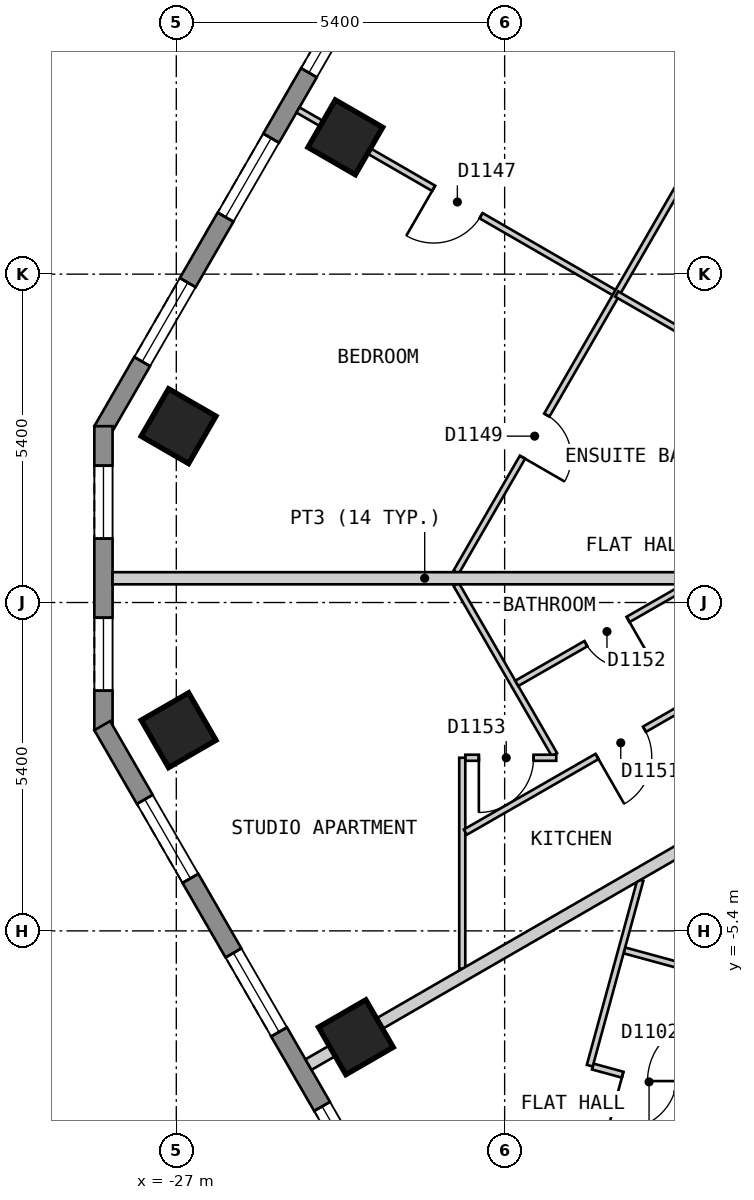
"""IFC4 building model, lengths in metres.
Left out: names, types, materials, properties, quantities, classifications, styles, units other than length and angle.
Written with IfcOpenShell. Run it as: python <this file> out.ifc"""

import sys

from ifc_helpers import new_model, si_unit, direction, frame, frame_2d, origin, origin_2d, place, context, subcontext, project, spatial, polyline, rectangle, outline, extrude, element, fill, save


model = new_model("IFC4")
c1 = context("Model", 3, precision=1e-05, world=origin(), true_north=direction((0.0, 1.0)))
c2 = subcontext(c1, "Body", "Model", "MODEL_VIEW")
j1 = project(units=[si_unit("LENGTHUNIT", "METRE"), si_unit("PLANEANGLEUNIT", "RADIAN")], contexts=[c1])
p1 = place(None, origin())
s1 = spatial("IfcSite", under=j1, at=p1, CompositionType="ELEMENT")
p2 = place(p1, origin())
s2 = spatial("IfcBuilding", under=s1, at=p2, CompositionType="ELEMENT")
p3 = place(p2, frame((0.0, 0.0, 144.6)))
s3 = spatial("IfcBuildingStorey", under=s2, at=p3, CompositionType="ELEMENT", Elevation=144.6)
for number, where, z_axis, x_axis in (
    (1, (-24.22, 7.65, 0.0), (0.0, 0.0, 1.0), (-0.5, -0.866, 0.0)),
    (2, (-26.963, 2.9, 0.0), (0.0, 0.0, 1.0), (-0.5, -0.866, 0.0)),
    (3, (-26.962, -2.1, 0.0), (0.0, 0.0, 1.0), (0.5, -0.866, 0.0)),
    (4, (-24.047, -7.149, 0.0), (0.0, 0.0, 1.0), (0.5, -0.866, 0.0)),
):
    element("IfcColumn", number, at=place(p3, frame(where, z_axis=z_axis, x_axis=x_axis)), inside=s3, PredefinedType="COLUMN", context=c2, shape_type="SweptSolid", body=[
        extrude(rectangle(XDim=0.9, YDim=0.9, at=origin_2d()), origin(), (0.0, 0.0, 1.0), 3.0),
    ])
p4 = place(p3, frame((-16.555, 23.025, 0.0), z_axis=(0.0, 0.0, 1.0), x_axis=(-0.500020536353, -0.866013546791, 0.0)))
e5 = element("IfcWall", 5, at=p4, inside=s3, PredefinedType="SOLIDWALL", context=c2, shape_type="SweptSolid", body=[
    extrude(outline(polyline([(0.0, -0.15), (23.325, -0.15), (23.245, 0.15), (0.08, 0.15), (0.0, -0.15)])), origin(), (0.0, 0.0, 1.0), 2.7),
])
p5 = place(p4, frame((1.314, 0.0, 0.15)))
e6 = element("IfcOpeningElement", 6, at=p5, cuts=e5, PredefinedType="OPENING", context=c2, shape_type="SweptSolid", body=[
    extrude(rectangle(XDim=1.5, YDim=2.1, at=frame_2d((0.75, 1.05))), frame((0.0, 0.16, 0.0), z_axis=(0.0, -1.0, 0.0), x_axis=(1.0, 0.0, 0.0)), (0.0, 0.0, 1.0), 0.32),
])
p6 = place(p4, frame((4.056, 0.0, 0.15)))
e7 = element("IfcOpeningElement", 7, at=p6, cuts=e5, PredefinedType="OPENING", context=c2, shape_type="SweptSolid", body=[
    extrude(rectangle(XDim=1.5, YDim=2.1, at=frame_2d((0.75, 1.05))), frame((0.0, 0.16, 0.0), z_axis=(0.0, -1.0, 0.0), x_axis=(1.0, 0.0, 0.0)), (0.0, 0.0, 1.0), 0.32),
])
p7 = place(p4, frame((6.799, 0.0, 0.15)))
e8 = element("IfcOpeningElement", 8, at=p7, cuts=e5, PredefinedType="OPENING", context=c2, shape_type="SweptSolid", body=[
    extrude(rectangle(XDim=1.5, YDim=2.1, at=frame_2d((0.75, 1.05))), frame((0.0, 0.16, 0.0), z_axis=(0.0, -1.0, 0.0), x_axis=(1.0, 0.0, 0.0)), (0.0, 0.0, 1.0), 0.32),
])
p8 = place(p4, frame((9.541, 0.0, 0.15)))
e9 = element("IfcOpeningElement", 9, at=p8, cuts=e5, PredefinedType="OPENING", context=c2, shape_type="SweptSolid", body=[
    extrude(rectangle(XDim=1.5, YDim=2.1, at=frame_2d((0.75, 1.05))), frame((0.0, 0.16, 0.0), z_axis=(0.0, -1.0, 0.0), x_axis=(1.0, 0.0, 0.0)), (0.0, 0.0, 1.0), 0.32),
])
p9 = place(p4, frame((12.285, 0.0, 0.15)))
e10 = element("IfcOpeningElement", 10, at=p9, cuts=e5, PredefinedType="OPENING", context=c2, shape_type="SweptSolid", body=[
    extrude(rectangle(XDim=1.5, YDim=2.1, at=frame_2d((0.75, 1.05))), frame((0.0, 0.16, 0.0), z_axis=(0.0, -1.0, 0.0), x_axis=(1.0, 0.0, 0.0)), (0.0, 0.0, 1.0), 0.32),
])
p10 = place(p4, frame((15.027, 0.0, 0.15)))
e11 = element("IfcOpeningElement", 11, at=p10, cuts=e5, PredefinedType="OPENING", context=c2, shape_type="SweptSolid", body=[
    extrude(rectangle(XDim=1.5, YDim=2.1, at=frame_2d((0.75, 1.05))), frame((0.0, 0.16, 0.0), z_axis=(0.0, -1.0, 0.0), x_axis=(1.0, 0.0, 0.0)), (0.0, 0.0, 1.0), 0.32),
])
p11 = place(p4, frame((17.769, 0.0, 0.15)))
e12 = element("IfcOpeningElement", 12, at=p11, cuts=e5, PredefinedType="OPENING", context=c2, shape_type="SweptSolid", body=[
    extrude(rectangle(XDim=1.5, YDim=2.1, at=frame_2d((0.75, 1.05))), frame((0.0, 0.16, 0.0), z_axis=(0.0, -1.0, 0.0), x_axis=(1.0, 0.0, 0.0)), (0.0, 0.0, 1.0), 0.32),
])
p12 = place(p4, frame((20.512, 0.0, 0.15)))
e13 = element("IfcOpeningElement", 13, at=p12, cuts=e5, PredefinedType="OPENING", context=c2, shape_type="SweptSolid", body=[
    extrude(rectangle(XDim=1.5, YDim=2.1, at=frame_2d((0.75, 1.05))), frame((0.0, 0.16, 0.0), z_axis=(0.0, -1.0, 0.0), x_axis=(1.0, 0.0, 0.0)), (0.0, 0.0, 1.0), 0.32),
])
p13 = place(p3, frame((-28.198, 2.9, 0.0), z_axis=(0.0, 0.0, 1.0), x_axis=(0.0, -1.0, 0.0)))
e14 = element("IfcWall", 14, at=p13, inside=s3, PredefinedType="SOLIDWALL", context=c2, shape_type="SweptSolid", body=[
    extrude(outline(polyline([(0.0, -0.15), (5.0, -0.15), (4.92, 0.15), (0.08, 0.15), (0.0, -0.15)])), origin(), (0.0, 0.0, 1.0), 2.7),
])
p14 = place(p13, frame((0.65, 0.0, 0.15)))
e15 = element("IfcOpeningElement", 15, at=p14, cuts=e14, PredefinedType="OPENING", context=c2, shape_type="SweptSolid", body=[
    extrude(rectangle(XDim=1.2, YDim=2.1, at=frame_2d((0.6, 1.05))), frame((0.0, 0.16, 0.0), z_axis=(0.0, -1.0, 0.0), x_axis=(1.0, 0.0, 0.0)), (0.0, 0.0, 1.0), 0.32),
])
p15 = place(p13, frame((3.15, 0.0, 0.15)))
e16 = element("IfcOpeningElement", 16, at=p15, cuts=e14, PredefinedType="OPENING", context=c2, shape_type="SweptSolid", body=[
    extrude(rectangle(XDim=1.2, YDim=2.1, at=frame_2d((0.6, 1.05))), frame((0.0, 0.16, 0.0), z_axis=(0.0, -1.0, 0.0), x_axis=(1.0, 0.0, 0.0)), (0.0, 0.0, 1.0), 0.32),
])
p16 = place(p3, frame((-28.218, -2.025, 0.0), z_axis=(0.0, 0.0, 1.0), x_axis=(0.500017503135, -0.866015298109, 0.0)))
e17 = element("IfcWall", 17, at=p16, inside=s3, PredefinedType="SOLIDWALL", context=c2, shape_type="SweptSolid", body=[
    extrude(outline(polyline([(0.0, -0.15), (24.711, -0.15), (24.631, 0.15), (0.08, 0.15), (0.0, -0.15)])), origin(), (0.0, 0.0, 1.0), 2.7),
])
p17 = place(p16, frame((1.4, 0.0, 0.15)))
e18 = element("IfcOpeningElement", 18, at=p17, cuts=e17, PredefinedType="OPENING", context=c2, shape_type="SweptSolid", body=[
    extrude(rectangle(XDim=1.5, YDim=2.1, at=frame_2d((0.75, 1.05))), frame((0.0, 0.16, 0.0), z_axis=(0.0, -1.0, 0.0), x_axis=(1.0, 0.0, 0.0)), (0.0, 0.0, 1.0), 0.32),
])
p18 = place(p16, frame((4.316, 0.0, 0.15)))
e19 = element("IfcOpeningElement", 19, at=p18, cuts=e17, PredefinedType="OPENING", context=c2, shape_type="SweptSolid", body=[
    extrude(rectangle(XDim=1.5, YDim=2.1, at=frame_2d((0.75, 1.05))), frame((0.0, 0.16, 0.0), z_axis=(0.0, -1.0, 0.0), x_axis=(1.0, 0.0, 0.0)), (0.0, 0.0, 1.0), 0.32),
])
p19 = place(p16, frame((7.231, 0.0, 0.15)))
e20 = element("IfcOpeningElement", 20, at=p19, cuts=e17, PredefinedType="OPENING", context=c2, shape_type="SweptSolid", body=[
    extrude(rectangle(XDim=1.5, YDim=2.1, at=frame_2d((0.75, 1.05))), frame((0.0, 0.16, 0.0), z_axis=(0.0, -1.0, 0.0), x_axis=(1.0, 0.0, 0.0)), (0.0, 0.0, 1.0), 0.32),
])
p20 = place(p16, frame((10.147, 0.0, 0.15)))
e21 = element("IfcOpeningElement", 21, at=p20, cuts=e17, PredefinedType="OPENING", context=c2, shape_type="SweptSolid", body=[
    extrude(rectangle(XDim=1.5, YDim=2.1, at=frame_2d((0.75, 1.05))), frame((0.0, 0.16, 0.0), z_axis=(0.0, -1.0, 0.0), x_axis=(1.0, 0.0, 0.0)), (0.0, 0.0, 1.0), 0.32),
])
p21 = place(p16, frame((13.062, 0.0, 0.15)))
e22 = element("IfcOpeningElement", 22, at=p21, cuts=e17, PredefinedType="OPENING", context=c2, shape_type="SweptSolid", body=[
    extrude(rectangle(XDim=1.5, YDim=2.1, at=frame_2d((0.75, 1.05))), frame((0.0, 0.16, 0.0), z_axis=(0.0, -1.0, 0.0), x_axis=(1.0, 0.0, 0.0)), (0.0, 0.0, 1.0), 0.32),
])
p22 = place(p16, frame((15.977, 0.0, 0.15)))
e23 = element("IfcOpeningElement", 23, at=p22, cuts=e17, PredefinedType="OPENING", context=c2, shape_type="SweptSolid", body=[
    extrude(rectangle(XDim=1.5, YDim=2.1, at=frame_2d((0.75, 1.05))), frame((0.0, 0.16, 0.0), z_axis=(0.0, -1.0, 0.0), x_axis=(1.0, 0.0, 0.0)), (0.0, 0.0, 1.0), 0.32),
])
p23 = place(p16, frame((18.893, 0.0, 0.15)))
e24 = element("IfcOpeningElement", 24, at=p23, cuts=e17, PredefinedType="OPENING", context=c2, shape_type="SweptSolid", body=[
    extrude(rectangle(XDim=1.5, YDim=2.1, at=frame_2d((0.75, 1.05))), frame((0.0, 0.16, 0.0), z_axis=(0.0, -1.0, 0.0), x_axis=(1.0, 0.0, 0.0)), (0.0, 0.0, 1.0), 0.32),
])
p24 = place(p16, frame((21.809, 0.0, 0.15)))
e25 = element("IfcOpeningElement", 25, at=p24, cuts=e17, PredefinedType="OPENING", context=c2, shape_type="SweptSolid", body=[
    extrude(rectangle(XDim=1.5, YDim=2.1, at=frame_2d((0.75, 1.05))), frame((0.0, 0.16, 0.0), z_axis=(0.0, -1.0, 0.0), x_axis=(1.0, 0.0, 0.0)), (0.0, 0.0, 1.0), 0.32),
])
p25 = place(p3, frame((-22.398, 0.299, 0.0), z_axis=(0.0, 0.0, 1.0), x_axis=(0.50004249738, -0.86600086652, 0.0)))
e26 = element("IfcWall", 26, at=p25, inside=s3, PredefinedType="PARTITIONING", context=c2, shape_type="SweptSolid", body=[
    extrude(rectangle(XDim=3.236, YDim=0.1, at=frame_2d((1.618, 0.0))), origin(), (0.0, 0.0, 1.0), 2.7),
])
p26 = place(p3, frame((-19.631, -5.721, 0.0), z_axis=(0.0, 0.0, 1.0), x_axis=(0.964816035809, -0.262925877475, 0.0)))
e27 = element("IfcWall", 27, at=p26, inside=s3, PredefinedType="PARTITIONING", context=c2, shape_type="SweptSolid", body=[
    extrude(rectangle(XDim=3.344, YDim=0.1, at=frame_2d((1.672, 0.0))), origin(), (0.0, 0.0, 1.0), 2.7),
])
p27 = place(p26, frame((1.047, 0.0, 0.0)))
e28 = element("IfcOpeningElement", 28, at=p27, cuts=e27, PredefinedType="OPENING", context=c2, shape_type="SweptSolid", body=[
    extrude(rectangle(XDim=0.8, YDim=2.1, at=frame_2d((0.4, 1.05))), frame((0.0, 0.06, 0.0), z_axis=(0.0, -1.0, 0.0), x_axis=(1.0, 0.0, 0.0)), (0.0, 0.0, 1.0), 0.12),
])
p28 = place(p3, frame((-20.151, -7.631, 0.0), z_axis=(0.0, 0.0, 1.0), x_axis=(0.964784947449, -0.263039930765, 0.0)))
e29 = element("IfcWall", 29, at=p28, inside=s3, PredefinedType="PARTITIONING", context=c2, shape_type="SweptSolid", body=[
    extrude(rectangle(XDim=1.866, YDim=0.1, at=frame_2d((0.933, 0.0))), origin(), (0.0, 0.0, 1.0), 2.7),
])
p29 = place(p28, frame((0.51, 0.0, 0.0)))
e30 = element("IfcOpeningElement", 30, at=p29, cuts=e29, PredefinedType="OPENING", context=c2, shape_type="SweptSolid", body=[
    extrude(rectangle(XDim=0.9, YDim=2.1, at=frame_2d((0.45, 1.05))), frame((0.0, 0.06, 0.0), z_axis=(0.0, -1.0, 0.0), x_axis=(1.0, 0.0, 0.0)), (0.0, 0.0, 1.0), 0.12),
])
p30 = place(p3, frame((-24.999, 8.1, 0.0), z_axis=(0.0, 0.0, 1.0), x_axis=(0.865978029808, -0.500082045158, 0.0)))
e31 = element("IfcWall", 31, at=p30, inside=s3, PredefinedType="PARTITIONING", context=c2, shape_type="SweptSolid", body=[
    extrude(rectangle(XDim=6.053, YDim=0.1, at=frame_2d((3.027, 0.0))), origin(), (0.0, 0.0, 1.0), 2.7),
])
p31 = place(p30, frame((2.577, 0.0, 0.0)))
e32 = element("IfcOpeningElement", 32, at=p31, cuts=e31, PredefinedType="OPENING", context=c2, shape_type="SweptSolid", body=[
    extrude(rectangle(XDim=0.9, YDim=2.1, at=frame_2d((0.45, 1.05))), frame((0.0, 0.06, 0.0), z_axis=(0.0, -1.0, 0.0), x_axis=(1.0, 0.0, 0.0)), (0.0, 0.0, 1.0), 0.12),
])
p32 = place(p3, frame((-22.247, -2.553, 0.0), z_axis=(0.0, 0.0, 1.0), x_axis=(1.0, 0.0, 0.0)))
e33 = element("IfcWall", 33, at=p32, inside=s3, PredefinedType="PARTITIONING", context=c2, shape_type="SweptSolid", body=[
    extrude(rectangle(XDim=1.496, YDim=0.1, at=frame_2d((0.748, 0.0))), origin(), (0.0, 0.0, 1.0), 2.7),
])
p33 = place(p32, frame((0.223, 0.0, 0.0)))
e34 = element("IfcOpeningElement", 34, at=p33, cuts=e33, PredefinedType="OPENING", context=c2, shape_type="SweptSolid", body=[
    extrude(rectangle(XDim=0.9, YDim=2.1, at=frame_2d((0.45, 1.05))), frame((0.0, 0.06, 0.0), z_axis=(0.0, -1.0, 0.0), x_axis=(1.0, 0.0, 0.0)), (0.0, 0.0, 1.0), 0.12),
])
p34 = place(p3, frame((-22.398, 0.499, 0.0), z_axis=(0.0, 0.0, 1.0), x_axis=(0.499981561717, 0.866036048871, 0.0)))
e35 = element("IfcWall", 35, at=p34, inside=s3, PredefinedType="PARTITIONING", context=c2, shape_type="SweptSolid", body=[
    extrude(rectangle(XDim=21.532, YDim=0.1, at=frame_2d((10.766, 0.0))), origin(), (0.0, 0.0, 1.0), 2.7),
])
p35 = place(p34, frame((13.049, 0.0, 0.0)))
e36 = element("IfcOpeningElement", 36, at=p35, cuts=e35, PredefinedType="OPENING", context=c2, shape_type="SweptSolid", body=[
    extrude(rectangle(XDim=0.9, YDim=2.1, at=frame_2d((0.45, 1.05))), frame((0.0, 0.06, 0.0), z_axis=(0.0, -1.0, 0.0), x_axis=(1.0, 0.0, 0.0)), (0.0, 0.0, 1.0), 0.12),
])
p36 = place(p34, frame((2.183, 0.0, 0.0)))
e37 = element("IfcOpeningElement", 37, at=p36, cuts=e35, PredefinedType="OPENING", context=c2, shape_type="SweptSolid", body=[
    extrude(rectangle(XDim=0.8, YDim=2.1, at=frame_2d((0.4, 1.05))), frame((0.0, 0.06, 0.0), z_axis=(0.0, -1.0, 0.0), x_axis=(1.0, 0.0, 0.0)), (0.0, 0.0, 1.0), 0.12),
])
p37 = place(p3, frame((-20.2, -7.617, 0.0), z_axis=(0.0, 0.0, 1.0), x_axis=(0.263150035392, 0.964754921663, 0.0)))
e38 = element("IfcWall", 38, at=p37, inside=s3, PredefinedType="PARTITIONING", context=c2, shape_type="SweptSolid", body=[
    extrude(rectangle(XDim=3.166, YDim=0.1, at=frame_2d((1.583, 0.0))), origin(), (0.0, 0.0, 1.0), 2.7),
])
p38 = place(p3, frame((-22.297, -6.023, 0.0), z_axis=(0.0, 0.0, 1.0), x_axis=(0.0, 1.0, 0.0)))
e39 = element("IfcWall", 39, at=p38, inside=s3, PredefinedType="PARTITIONING", context=c2, shape_type="SweptSolid", body=[
    extrude(rectangle(XDim=3.47, YDim=0.1, at=frame_2d((1.735, 0.0))), origin(), (0.0, 0.0, 1.0), 2.7),
])
p39 = place(p3, frame((-22.247, -3.776, 0.0), z_axis=(0.0, 0.0, 1.0), x_axis=(0.867243093247, 0.497884943752, 0.0)))
e40 = element("IfcWall", 40, at=p39, inside=s3, PredefinedType="PARTITIONING", context=c2, shape_type="SweptSolid", body=[
    extrude(rectangle(XDim=5.854, YDim=0.1, at=frame_2d((2.927, 0.0))), origin(), (0.0, 0.0, 1.0), 2.7),
])
p40 = place(p39, frame((2.498, 0.0, 0.0)))
e41 = element("IfcOpeningElement", 41, at=p40, cuts=e40, PredefinedType="OPENING", context=c2, shape_type="SweptSolid", body=[
    extrude(rectangle(XDim=0.9, YDim=2.1, at=frame_2d((0.45, 1.05))), frame((0.0, 0.06, 0.0), z_axis=(0.0, -1.0, 0.0), x_axis=(1.0, 0.0, 0.0)), (0.0, 0.0, 1.0), 0.12),
])
p41 = place(p3, frame((-21.4, -1.329, 0.0), z_axis=(0.0, 0.0, 1.0), x_axis=(0.867235187435, 0.497898714274, 0.0)))
e42 = element("IfcWall", 42, at=p41, inside=s3, PredefinedType="PARTITIONING", context=c2, shape_type="SweptSolid", body=[
    extrude(rectangle(XDim=3.27, YDim=0.1, at=frame_2d((1.635, 0.0))), origin(), (0.0, 0.0, 1.0), 2.7),
])
p42 = place(p41, frame((1.31, 0.0, 0.0)))
e43 = element("IfcOpeningElement", 43, at=p42, cuts=e42, PredefinedType="OPENING", context=c2, shape_type="SweptSolid", body=[
    extrude(rectangle(XDim=0.8, YDim=2.1, at=frame_2d((0.4, 1.05))), frame((0.0, 0.06, 0.0), z_axis=(0.0, -1.0, 0.0), x_axis=(1.0, 0.0, 0.0)), (0.0, 0.0, 1.0), 0.12),
])
p43 = place(p3, frame((-28.048, 0.399, 0.0), z_axis=(0.0, 0.0, 1.0), x_axis=(1.0, 0.0, 0.0)))
e44 = element("IfcWall", 44, at=p43, inside=s3, PredefinedType="PARTITIONING", context=c2, shape_type="SweptSolid", body=[
    extrude(rectangle(XDim=10.266, YDim=0.2, at=frame_2d((5.133, 0.0))), origin(), (0.0, 0.0, 1.0), 2.7),
])
p44 = place(p3, frame((-24.826, -7.599, 0.0), z_axis=(0.0, 0.0, 1.0), x_axis=(0.866031973572, 0.499988620622, 0.0)))
e45 = element("IfcWall", 45, at=p44, inside=s3, PredefinedType="PARTITIONING", context=c2, shape_type="SweptSolid", body=[
    extrude(rectangle(XDim=7.728, YDim=0.2, at=frame_2d((3.864, 0.0))), origin(), (0.0, 0.0, 1.0), 2.7),
])
p45 = place(p3, frame((-19.757, 5.073, 0.0), z_axis=(0.0, 0.0, 1.0), x_axis=(0.866076396086, -0.499911668341, 0.0)))
e46 = element("IfcWall", 46, at=p45, inside=s3, PredefinedType="PARTITIONING", context=c2, shape_type="SweptSolid", body=[
    extrude(rectangle(XDim=3.947, YDim=0.1, at=frame_2d((1.973, 0.0))), origin(), (0.0, 0.0, 1.0), 2.7),
])
p46 = place(p10, origin())
e47 = element("IfcWindow", 47, at=p46, inside=s3, PartitioningType="SINGLE_PANEL", PredefinedType="WINDOW", context=c2, shape_type="SweptSolid", body=[
    extrude(rectangle(XDim=1.5, YDim=2.1, at=frame_2d((0.75, 1.05))), frame((0.0, 0.03, 0.0), z_axis=(0.0, -1.0, 0.0), x_axis=(1.0, 0.0, 0.0)), (0.0, 0.0, 1.0), 0.06),
])
fill(e11, e47)
p47 = place(p11, origin())
e48 = element("IfcWindow", 48, at=p47, inside=s3, PartitioningType="SINGLE_PANEL", PredefinedType="WINDOW", context=c2, shape_type="SweptSolid", body=[
    extrude(rectangle(XDim=1.5, YDim=2.1, at=frame_2d((0.75, 1.05))), frame((0.0, 0.03, 0.0), z_axis=(0.0, -1.0, 0.0), x_axis=(1.0, 0.0, 0.0)), (0.0, 0.0, 1.0), 0.06),
])
fill(e12, e48)
p48 = place(p12, origin())
e49 = element("IfcWindow", 49, at=p48, inside=s3, PartitioningType="SINGLE_PANEL", PredefinedType="WINDOW", context=c2, shape_type="SweptSolid", body=[
    extrude(rectangle(XDim=1.5, YDim=2.1, at=frame_2d((0.75, 1.05))), frame((0.0, 0.03, 0.0), z_axis=(0.0, -1.0, 0.0), x_axis=(1.0, 0.0, 0.0)), (0.0, 0.0, 1.0), 0.06),
])
fill(e13, e49)
p49 = place(p14, origin())
e50 = element("IfcWindow", 50, at=p49, inside=s3, PartitioningType="SINGLE_PANEL", PredefinedType="WINDOW", context=c2, shape_type="SweptSolid", body=[
    extrude(rectangle(XDim=1.2, YDim=2.1, at=frame_2d((0.6, 1.05))), frame((0.0, 0.03, 0.0), z_axis=(0.0, -1.0, 0.0), x_axis=(1.0, 0.0, 0.0)), (0.0, 0.0, 1.0), 0.06),
])
fill(e15, e50)
p50 = place(p15, origin())
e51 = element("IfcWindow", 51, at=p50, inside=s3, PartitioningType="SINGLE_PANEL", PredefinedType="WINDOW", context=c2, shape_type="SweptSolid", body=[
    extrude(rectangle(XDim=1.2, YDim=2.1, at=frame_2d((0.6, 1.05))), frame((0.0, 0.03, 0.0), z_axis=(0.0, -1.0, 0.0), x_axis=(1.0, 0.0, 0.0)), (0.0, 0.0, 1.0), 0.06),
])
fill(e16, e51)
p51 = place(p17, origin())
e52 = element("IfcWindow", 52, at=p51, inside=s3, PartitioningType="SINGLE_PANEL", PredefinedType="WINDOW", context=c2, shape_type="SweptSolid", body=[
    extrude(rectangle(XDim=1.5, YDim=2.1, at=frame_2d((0.75, 1.05))), frame((0.0, 0.03, 0.0), z_axis=(0.0, -1.0, 0.0), x_axis=(1.0, 0.0, 0.0)), (0.0, 0.0, 1.0), 0.06),
])
fill(e18, e52)
p52 = place(p18, origin())
e53 = element("IfcWindow", 53, at=p52, inside=s3, PartitioningType="SINGLE_PANEL", PredefinedType="WINDOW", context=c2, shape_type="SweptSolid", body=[
    extrude(rectangle(XDim=1.5, YDim=2.1, at=frame_2d((0.75, 1.05))), frame((0.0, 0.03, 0.0), z_axis=(0.0, -1.0, 0.0), x_axis=(1.0, 0.0, 0.0)), (0.0, 0.0, 1.0), 0.06),
])
fill(e19, e53)
p53 = place(p19, origin())
e54 = element("IfcWindow", 54, at=p53, inside=s3, PartitioningType="SINGLE_PANEL", PredefinedType="WINDOW", context=c2, shape_type="SweptSolid", body=[
    extrude(rectangle(XDim=1.5, YDim=2.1, at=frame_2d((0.75, 1.05))), frame((0.0, 0.03, 0.0), z_axis=(0.0, -1.0, 0.0), x_axis=(1.0, 0.0, 0.0)), (0.0, 0.0, 1.0), 0.06),
])
fill(e20, e54)
p54 = place(p29, origin())
e55 = element("IfcDoor", 55, at=p54, inside=s3, OperationType="SINGLE_SWING_LEFT", PredefinedType="DOOR", context=c2, shape_type="SweptSolid", body=[
    extrude(rectangle(XDim=0.9, YDim=2.1, at=frame_2d((0.45, 1.05))), frame((0.0, 0.025, 0.0), z_axis=(0.0, -1.0, 0.0), x_axis=(1.0, 0.0, 0.0)), (0.0, 0.0, 1.0), 0.05),
])
fill(e30, e55)
p55 = place(p31, origin())
e56 = element("IfcDoor", 56, at=p55, inside=s3, OperationType="SINGLE_SWING_LEFT", PredefinedType="DOOR", context=c2, shape_type="SweptSolid", body=[
    extrude(rectangle(XDim=0.9, YDim=2.1, at=frame_2d((0.45, 1.05))), frame((0.0, 0.025, 0.0), z_axis=(0.0, -1.0, 0.0), x_axis=(1.0, 0.0, 0.0)), (0.0, 0.0, 1.0), 0.05),
])
fill(e32, e56)
p56 = place(p36, origin())
e57 = element("IfcDoor", 57, at=p56, inside=s3, OperationType="SINGLE_SWING_LEFT", PredefinedType="DOOR", context=c2, shape_type="SweptSolid", body=[
    extrude(rectangle(XDim=0.8, YDim=2.1, at=frame_2d((0.4, 1.05))), frame((0.0, 0.025, 0.0), z_axis=(0.0, -1.0, 0.0), x_axis=(1.0, 0.0, 0.0)), (0.0, 0.0, 1.0), 0.05),
])
fill(e37, e57)
p57 = place(p40, origin())
e58 = element("IfcDoor", 58, at=p57, inside=s3, OperationType="SINGLE_SWING_LEFT", PredefinedType="DOOR", context=c2, shape_type="SweptSolid", body=[
    extrude(rectangle(XDim=0.9, YDim=2.1, at=frame_2d((0.45, 1.05))), frame((0.0, 0.025, 0.0), z_axis=(0.0, -1.0, 0.0), x_axis=(1.0, 0.0, 0.0)), (0.0, 0.0, 1.0), 0.05),
])
fill(e41, e58)
p58 = place(p42, origin())
e59 = element("IfcDoor", 59, at=p58, inside=s3, OperationType="SINGLE_SWING_RIGHT", PredefinedType="DOOR", context=c2, shape_type="SweptSolid", body=[
    extrude(rectangle(XDim=0.8, YDim=2.1, at=frame_2d((0.4, 1.05))), frame((0.0, 0.025, 0.0), z_axis=(0.0, -1.0, 0.0), x_axis=(1.0, 0.0, 0.0)), (0.0, 0.0, 1.0), 0.05),
])
fill(e43, e59)
p59 = place(p33, origin())
e60 = element("IfcDoor", 60, at=p59, inside=s3, OperationType="SINGLE_SWING_LEFT", PredefinedType="DOOR", context=c2, shape_type="SweptSolid", body=[
    extrude(rectangle(XDim=0.9, YDim=2.1, at=frame_2d((0.45, 1.05))), frame((0.0, 0.025, 0.0), z_axis=(0.0, -1.0, 0.0), x_axis=(1.0, 0.0, 0.0)), (0.0, 0.0, 1.0), 0.05),
])
fill(e34, e60)
save(model, sys.argv[1])
